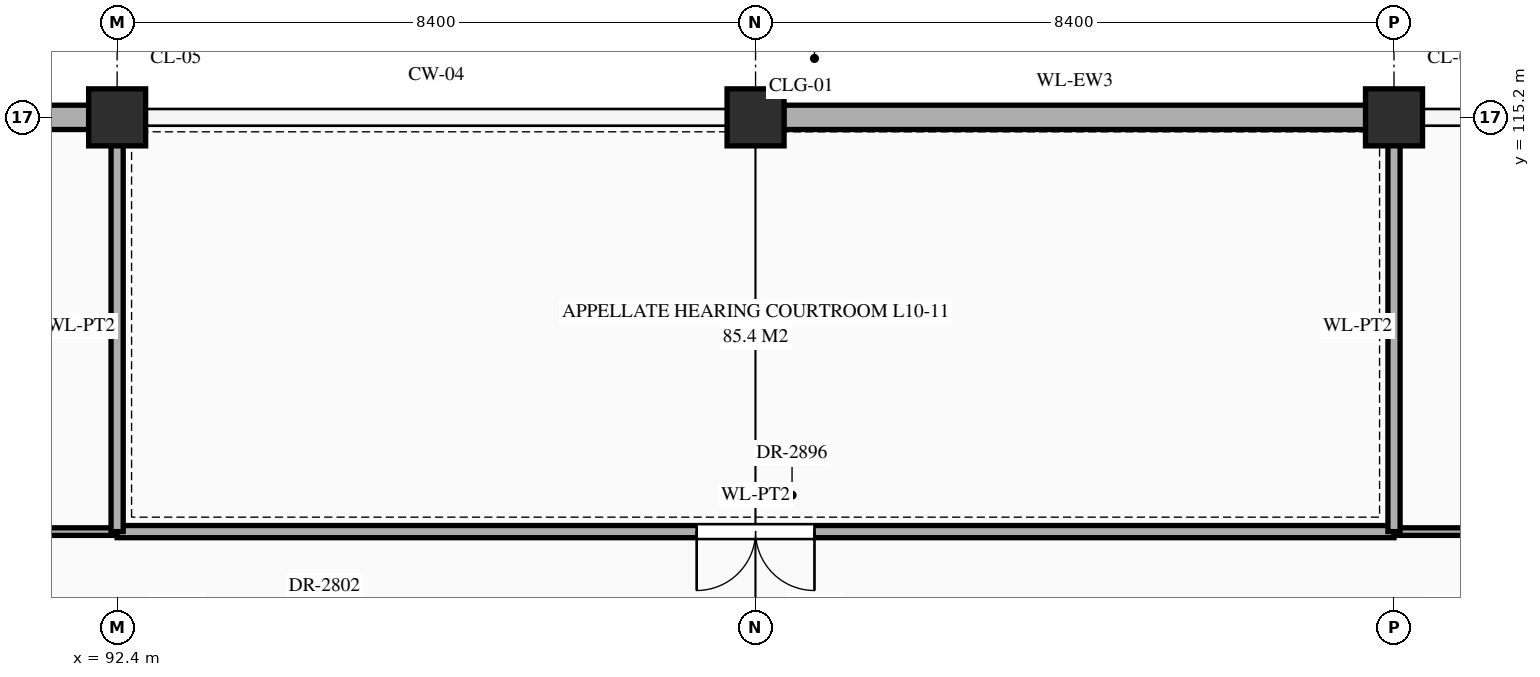
"""IFC4 building model, lengths in metres.
Left out: names, types, materials, properties, quantities, classifications, styles, units other than length and angle.
Written with IfcOpenShell. Run it as: python <this file> out.ifc"""

import sys

from ifc_helpers import new_model, si_unit, direction, frame, frame_2d, origin, origin_2d, place, context, subcontext, project, spatial, rectangle, extrude, element, fill, save


model = new_model("IFC4")
c1 = context("Model", 3, precision=1e-05, world=origin(), true_north=direction((0.0, 1.0)))
c2 = subcontext(c1, "Body", "Model", "MODEL_VIEW")
j1 = project(units=[si_unit("LENGTHUNIT", "METRE"), si_unit("PLANEANGLEUNIT", "RADIAN")], contexts=[c1])
p1 = place(None, origin())
s1 = spatial("IfcSite", under=j1, at=p1, CompositionType="ELEMENT")
p2 = place(p1, origin())
s2 = spatial("IfcBuilding", under=s1, at=p2, CompositionType="ELEMENT")
p3 = place(p2, frame((0.0, 0.0, 43.5)))
s3 = spatial("IfcBuildingStorey", under=s2, at=p3, CompositionType="ELEMENT", Elevation=43.5)
for number, where, z_axis, x_axis in (
    (1, (92.4, 115.2, 0.0), (0.0, 0.0, 1.0), (1.0, 0.0, 0.0)),
    (2, (100.8, 115.2, 0.0), (0.0, 0.0, 1.0), (1.0, 0.0, 0.0)),
    (3, (109.2, 115.2, 0.0), (0.0, 0.0, 1.0), (1.0, 0.0, 0.0)),
):
    element("IfcColumn", number, at=place(p3, frame(where, z_axis=z_axis, x_axis=x_axis)), inside=s3, PredefinedType="COLUMN", context=c2, shape_type="SweptSolid", body=[
        extrude(rectangle(XDim=0.75, YDim=0.75, at=origin_2d()), origin(), (0.0, 0.0, 1.0), 4.2),
    ])
p4 = place(p3, frame((84.37, 115.2, 0.0), z_axis=(0.0, 0.0, 1.0), x_axis=(1.0, 0.0, 0.0)))
e4 = element("IfcWall", 4, at=p4, inside=s3, PredefinedType="STANDARD", context=c2, shape_type="SweptSolid", body=[
    extrude(rectangle(XDim=7.66, YDim=0.32, at=frame_2d((3.83, 0.0))), origin(), (0.0, 0.0, 1.0), 3.35),
])
p5 = place(p4, frame((2.93, 0.0, 0.85)))
e5 = element("IfcOpeningElement", 5, at=p5, cuts=e4, PredefinedType="OPENING", context=c2, shape_type="SweptSolid", body=[
    extrude(rectangle(XDim=1.8, YDim=1.38, at=frame_2d((0.9, 0.69))), frame((0.0, 0.172, 0.0), z_axis=(0.0, -1.0, 0.0), x_axis=(1.0, 0.0, 0.0)), (0.0, 0.0, 1.0), 0.344),
])
p6 = place(p3, frame((101.17, 115.2, 0.0), z_axis=(0.0, 0.0, 1.0), x_axis=(1.0, 0.0, 0.0)))
e6 = element("IfcWall", 6, at=p6, inside=s3, PredefinedType="STANDARD", context=c2, shape_type="SweptSolid", body=[
    extrude(rectangle(XDim=7.66, YDim=0.32, at=frame_2d((3.83, 0.0))), origin(), (0.0, 0.0, 1.0), 3.35),
])
p7 = place(p3, frame((75.6, 109.75, 0.0), z_axis=(0.0, 0.0, 1.0), x_axis=(1.0, 0.0, 0.0)))
e7 = element("IfcWall", 7, at=p7, inside=s3, PredefinedType="STANDARD", context=c2, shape_type="SweptSolid", body=[
    extrude(rectangle(XDim=16.8, YDim=0.1, at=frame_2d((8.4, 0.0))), origin(), (0.0, 0.0, 1.0), 4.0),
])
p8 = place(p7, frame((3.69, 0.0, 0.0)))
e8 = element("IfcOpeningElement", 8, at=p8, cuts=e7, PredefinedType="OPENING", context=c2, shape_type="SweptSolid", body=[
    extrude(rectangle(XDim=1.02, YDim=2.4, at=frame_2d((0.51, 1.2))), frame((0.0, 0.062, 0.0), z_axis=(0.0, -1.0, 0.0), x_axis=(1.0, 0.0, 0.0)), (0.0, 0.0, 1.0), 0.124),
])
p9 = place(p7, frame((12.07, 0.0, 0.0)))
e9 = element("IfcOpeningElement", 9, at=p9, cuts=e7, PredefinedType="OPENING", context=c2, shape_type="SweptSolid", body=[
    extrude(rectangle(XDim=1.06, YDim=2.4, at=frame_2d((0.53, 1.2))), frame((0.0, 0.062, 0.0), z_axis=(0.0, -1.0, 0.0), x_axis=(1.0, 0.0, 0.0)), (0.0, 0.0, 1.0), 0.124),
])
p10 = place(p3, frame((92.4, 109.75, 0.0), z_axis=(0.0, 0.0, 1.0), x_axis=(1.0, 0.0, 0.0)))
e10 = element("IfcWall", 10, at=p10, inside=s3, PredefinedType="STANDARD", context=c2, shape_type="SweptSolid", body=[
    extrude(rectangle(XDim=16.8, YDim=0.16, at=frame_2d((8.4, 0.0))), origin(), (0.0, 0.0, 1.0), 4.0),
])
p11 = place(p10, frame((7.625, 0.0, 0.0)))
e11 = element("IfcOpeningElement", 11, at=p11, cuts=e10, PredefinedType="OPENING", context=c2, shape_type="SweptSolid", body=[
    extrude(rectangle(XDim=1.55, YDim=2.35, at=frame_2d((0.775, 1.175))), frame((0.0, 0.092, 0.0), z_axis=(0.0, -1.0, 0.0), x_axis=(1.0, 0.0, 0.0)), (0.0, 0.0, 1.0), 0.184),
])
p12 = place(p3, frame((109.2, 109.75, 0.0), z_axis=(0.0, 0.0, 1.0), x_axis=(1.0, 0.0, 0.0)))
e12 = element("IfcWall", 12, at=p12, inside=s3, PredefinedType="STANDARD", context=c2, shape_type="SweptSolid", body=[
    extrude(rectangle(XDim=8.36, YDim=0.1, at=frame_2d((4.18, 0.0))), origin(), (0.0, 0.0, 1.0), 4.0),
])
p13 = place(p12, frame((3.73, 0.0, 0.0)))
e13 = element("IfcOpeningElement", 13, at=p13, cuts=e12, PredefinedType="OPENING", context=c2, shape_type="SweptSolid", body=[
    extrude(rectangle(XDim=0.9, YDim=2.15, at=frame_2d((0.45, 1.075))), frame((0.0, 0.062, 0.0), z_axis=(0.0, -1.0, 0.0), x_axis=(1.0, 0.0, 0.0)), (0.0, 0.0, 1.0), 0.124),
])
for number, where, z_axis, x_axis in (
    (14, (92.4, 109.75, 0.0), (0.0, 0.0, 1.0), (0.0, 1.0, 0.0)),
    (15, (109.2, 109.75, 0.0), (0.0, 0.0, 1.0), (0.0, 1.0, 0.0)),
):
    element("IfcWall", number, at=place(p3, frame(where, z_axis=z_axis, x_axis=x_axis)), inside=s3, PredefinedType="STANDARD", context=c2, shape_type="SweptSolid", body=[
        extrude(rectangle(XDim=5.41, YDim=0.16, at=frame_2d((2.705, 0.0))), origin(), (0.0, 0.0, 1.0), 3.25),
    ])
p14 = place(p11, frame((1.55, 0.0, 0.0), z_axis=(0.0, 0.0, 1.0), x_axis=(-1.0, 0.0, 0.0)))
e16 = element("IfcDoor", 16, at=p14, inside=s3, OperationType="DOUBLE_DOOR_SINGLE_SWING", PredefinedType="DOOR", context=c2, shape_type="SweptSolid", body=[
    extrude(rectangle(XDim=1.55, YDim=2.35, at=frame_2d((0.775, 1.175))), frame((0.0, 0.025, 0.0), z_axis=(0.0, -1.0, 0.0), x_axis=(1.0, 0.0, 0.0)), (0.0, 0.0, 1.0), 0.05),
])
fill(e11, e16)
save(model, sys.argv[1])
